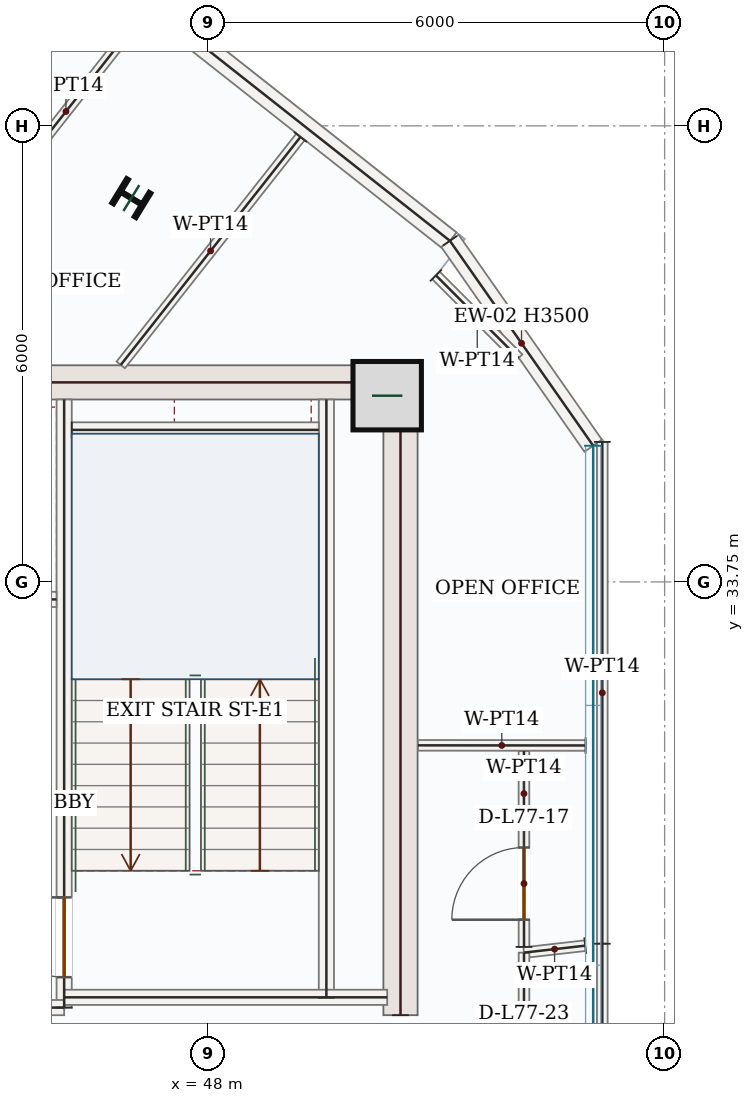
"""IFC4 building model, lengths in metres.
Left out: names, types, materials, properties, quantities, classifications, styles, units other than length and angle.
Written with IfcOpenShell. Run it as: python <this file> out.ifc"""

import sys

from ifc_helpers import new_model, si_unit, direction, frame, frame_2d, origin, origin_2d, place, context, subcontext, project, spatial, rectangle, i_section, extrude, source, transform, mapped, element, fill, save


model = new_model("IFC4")
c1 = context("Model", 3, precision=1e-05, world=origin(), true_north=direction((0.0, 1.0)))
c2 = subcontext(c1, "Body", "Model", "MODEL_VIEW")
j1 = project(units=[si_unit("LENGTHUNIT", "METRE"), si_unit("PLANEANGLEUNIT", "RADIAN")], contexts=[c1])
p1 = place(None, origin())
s1 = spatial("IfcSite", under=j1, at=p1, CompositionType="ELEMENT")
p2 = place(p1, origin())
s2 = spatial("IfcBuilding", under=s1, at=p2, CompositionType="ELEMENT")
p3 = place(p2, frame((0.0, 0.0, 319.8)))
s3 = spatial("IfcBuildingStorey", under=s2, at=p3, CompositionType="ELEMENT", Elevation=319.8)
m1 = source(origin(), c2, "Body", "SweptSolid", [
    extrude(rectangle(XDim=8.55, YDim=0.45, at=frame_2d((4.275, 0.0))), origin(), (0.0, 0.0, 1.0), 3.5),
])
p4 = place(p3, frame((50.525, 28.05, 0.0), z_axis=(0.0, 0.0, 1.0), x_axis=(0.0, 1.0, 0.0)))
e1 = element("IfcWall", 1, at=p4, inside=s3, PredefinedType="SHEAR", context=c2, shape_type="MappedRepresentation", body=[
    mapped(m1, transform((0.0, 0.0, 0.0), x_axis=(1.0, 0.0, 0.0), y_axis=(0.0, 1.0, 0.0), z_axis=(0.0, 0.0, 1.0), scale=1.0)),
])
m2 = source(origin(), c2, "Body", "SweptSolid", [
    extrude(rectangle(XDim=7.1, YDim=0.45, at=frame_2d((3.55, 0.0))), origin(), (0.0, 0.0, 1.0), 3.5),
])
p5 = place(p3, frame((43.2, 36.375, 0.0), z_axis=(0.0, 0.0, 1.0), x_axis=(1.0, 0.0, 0.0)))
e2 = element("IfcWall", 2, at=p5, inside=s3, PredefinedType="SHEAR", context=c2, shape_type="MappedRepresentation", body=[
    mapped(m2, transform((0.0, 0.0, 0.0), x_axis=(1.0, 0.0, 0.0), y_axis=(0.0, 1.0, 0.0), z_axis=(0.0, 0.0, 1.0), scale=1.0)),
])
m3 = source(origin(), c2, "Body", "SweptSolid", [
    extrude(rectangle(XDim=0.9, YDim=0.9, at=origin_2d()), origin(), (0.0, 0.0, 1.0), 3.75),
])
p6 = place(p3, frame((50.35, 36.2, 0.0), z_axis=(0.0, 0.0, 1.0), x_axis=(1.0, 0.0, 0.0)))
e3 = element("IfcColumn", 3, at=p6, inside=s3, PredefinedType="COLUMN", context=c2, shape_type="MappedRepresentation", body=[
    mapped(m3, transform((0.0, 0.0, 0.0), x_axis=(1.0, 0.0, 0.0), y_axis=(0.0, 1.0, 0.0), z_axis=(0.0, 0.0, 1.0), scale=1.0)),
])
m4 = source(origin(), c2, "Body", "SweptSolid", [
    extrude(i_section(OverallWidth=0.374, OverallDepth=0.372, WebThickness=0.016, FlangeThickness=0.026, FilletRadius=0.018, at=origin_2d()), origin(), (0.0, 0.0, 1.0), 3.75),
])
p7 = place(p3, frame((46.984, 38.8, 0.0), z_axis=(0.0, 0.0, 1.0), x_axis=(0.522498564716, 0.852640164354, 0.0)))
e4 = element("IfcColumn", 4, at=p7, inside=s3, PredefinedType="COLUMN", context=c2, shape_type="MappedRepresentation", body=[
    mapped(m4, transform((0.0, 0.0, 0.0), x_axis=(1.0, 0.0, 0.0), y_axis=(0.0, 1.0, 0.0), z_axis=(0.0, 0.0, 1.0), scale=1.0)),
])
m5 = source(origin(), c2, "Body", "SweptSolid", [
    extrude(rectangle(XDim=9.92, YDim=0.28, at=frame_2d((4.96, 0.0))), origin(), (0.0, 0.0, 1.0), 3.5),
])
p8 = place(p3, frame((43.385, 44.379, 0.0), z_axis=(0.0, 0.0, 1.0), x_axis=(0.785317257435, -0.619093535077, 0.0)))
e5 = element("IfcWall", 5, at=p8, inside=s3, PredefinedType="SOLIDWALL", context=c2, shape_type="MappedRepresentation", body=[
    mapped(m5, transform((0.0, 0.0, 0.0), x_axis=(1.0, 0.0, 0.0), y_axis=(0.0, 1.0, 0.0), z_axis=(0.0, 0.0, 1.0), scale=1.0)),
])
m6 = source(origin(), c2, "Body", "SweptSolid", [
    extrude(rectangle(XDim=3.29, YDim=0.28, at=frame_2d((1.645, 0.0))), origin(), (0.0, 0.0, 1.0), 3.5),
])
p9 = place(p3, frame((51.175, 38.238, 0.0), z_axis=(0.0, 0.0, 1.0), x_axis=(0.573043854491, -0.819524704222, 0.0)))
e6 = element("IfcWall", 6, at=p9, inside=s3, PredefinedType="SOLIDWALL", context=c2, shape_type="MappedRepresentation", body=[
    mapped(m6, transform((0.0, 0.0, 0.0), x_axis=(1.0, 0.0, 0.0), y_axis=(0.0, 1.0, 0.0), z_axis=(0.0, 0.0, 1.0), scale=1.0)),
])
m7 = source(origin(), c2, "Body", "SweptSolid", [
    extrude(rectangle(XDim=7.87, YDim=0.2, at=frame_2d((3.935, 0.0))), origin(), (0.0, 0.0, 1.0), 3.5),
])
p10 = place(p3, frame((49.55, 28.28, 0.0), z_axis=(0.0, 0.0, 1.0), x_axis=(0.0, 1.0, 0.0)))
e7 = element("IfcWall", 7, at=p10, inside=s3, PredefinedType="SOLIDWALL", context=c2, shape_type="MappedRepresentation", body=[
    mapped(m7, transform((0.0, 0.0, 0.0), x_axis=(1.0, 0.0, 0.0), y_axis=(0.0, 1.0, 0.0), z_axis=(0.0, 0.0, 1.0), scale=1.0)),
])
p11 = place(p3, frame((46.1, 28.15, 0.0), z_axis=(0.0, 0.0, 1.0), x_axis=(0.0, 1.0, 0.0)))
e8 = element("IfcWall", 8, at=p11, inside=s3, PredefinedType="SOLIDWALL", context=c2, shape_type="SweptSolid", body=[
    extrude(rectangle(XDim=8.0, YDim=0.2, at=frame_2d((4.0, 0.0))), origin(), (0.0, 0.0, 1.0), 3.5),
])
p12 = place(p11, frame((0.4, 0.0, 0.0)))
e9 = element("IfcOpeningElement", 9, at=p12, cuts=e8, PredefinedType="OPENING", context=c2, shape_type="SweptSolid", body=[
    extrude(rectangle(XDim=1.05, YDim=2.15, at=frame_2d((0.525, 1.075))), frame((0.0, 0.11, 0.0), z_axis=(0.0, -1.0, 0.0), x_axis=(1.0, 0.0, 0.0)), (0.0, 0.0, 1.0), 0.22),
])
m8 = source(origin(), c2, "Body", "SweptSolid", [
    extrude(rectangle(XDim=3.0, YDim=0.2, at=frame_2d((1.5, 0.0))), origin(), (0.0, 0.0, 1.0), 3.5),
])
p13 = place(p3, frame((43.1, 28.15, 0.0), z_axis=(0.0, 0.0, 1.0), x_axis=(1.0, 0.0, 0.0)))
e10 = element("IfcWall", 10, at=p13, inside=s3, PredefinedType="SOLIDWALL", context=c2, shape_type="MappedRepresentation", body=[
    mapped(m8, transform((0.0, 0.0, 0.0), x_axis=(1.0, 0.0, 0.0), y_axis=(0.0, 1.0, 0.0), z_axis=(0.0, 0.0, 1.0), scale=1.0)),
])
m9 = source(origin(), c2, "Body", "SweptSolid", [
    extrude(rectangle(XDim=4.25, YDim=0.2, at=frame_2d((2.125, 0.0))), origin(), (0.0, 0.0, 1.0), 3.5),
])
p14 = place(p3, frame((46.1, 28.285, 0.0), z_axis=(0.0, 0.0, 1.0), x_axis=(1.0, 0.0, 0.0)))
e11 = element("IfcWall", 11, at=p14, inside=s3, PredefinedType="SOLIDWALL", context=c2, shape_type="MappedRepresentation", body=[
    mapped(m9, transform((0.0, 0.0, 0.0), x_axis=(1.0, 0.0, 0.0), y_axis=(0.0, 1.0, 0.0), z_axis=(0.0, 0.0, 1.0), scale=1.0)),
])
m10 = source(origin(), c2, "Body", "SweptSolid", [
    extrude(rectangle(XDim=3.25, YDim=0.2, at=frame_2d((1.625, 0.0))), origin(), (0.0, 0.0, 1.0), 3.5),
])
p15 = place(p3, frame((46.2, 35.75, 0.0), z_axis=(0.0, 0.0, 1.0), x_axis=(1.0, 0.0, 0.0)))
e12 = element("IfcWall", 12, at=p15, inside=s3, PredefinedType="SOLIDWALL", context=c2, shape_type="MappedRepresentation", body=[
    mapped(m10, transform((0.0, 0.0, 0.0), x_axis=(1.0, 0.0, 0.0), y_axis=(0.0, 1.0, 0.0), z_axis=(0.0, 0.0, 1.0), scale=1.0)),
])
p16 = place(p3, frame((43.25, 33.52, 0.0), z_axis=(0.0, 0.0, 1.0), x_axis=(1.0, 0.0, 0.0)))
e13 = element("IfcWall", 13, at=p16, inside=s3, PredefinedType="SOLIDWALL", context=c2, shape_type="SweptSolid", body=[
    extrude(rectangle(XDim=2.75, YDim=0.2, at=frame_2d((1.375, 0.0))), origin(), (0.0, 0.0, 1.0), 3.5),
])
p17 = place(p16, frame((0.82, 0.0, 0.0)))
e14 = element("IfcOpeningElement", 14, at=p17, cuts=e13, PredefinedType="OPENING", context=c2, shape_type="SweptSolid", body=[
    extrude(rectangle(XDim=1.1, YDim=2.15, at=frame_2d((0.55, 1.075))), frame((0.0, 0.11, 0.0), z_axis=(0.0, -1.0, 0.0), x_axis=(1.0, 0.0, 0.0)), (0.0, 0.0, 1.0), 0.22),
])
m11 = source(origin(), c2, "Body", "SweptSolid", [
    extrude(rectangle(XDim=3.818, YDim=0.14, at=frame_2d((1.909, 0.0))), origin(), (0.0, 0.0, 1.0), 3.5),
])
p18 = place(p3, frame((49.208, 39.604, 0.0), z_axis=(0.0, 0.0, 1.0), x_axis=(-0.619119655452, -0.78529666511, 0.0)))
e15 = element("IfcWall", 15, at=p18, inside=s3, PredefinedType="PARTITIONING", context=c2, shape_type="MappedRepresentation", body=[
    mapped(m11, transform((0.0, 0.0, 0.0), x_axis=(1.0, 0.0, 0.0), y_axis=(0.0, 1.0, 0.0), z_axis=(0.0, 0.0, 1.0), scale=1.0)),
])
p19 = place(p3, frame((43.823, 37.02, 0.0), z_axis=(0.0, 0.0, 1.0), x_axis=(0.619105408422, 0.785307897109, 0.0)))
e16 = element("IfcWall", 16, at=p19, inside=s3, PredefinedType="PARTITIONING", context=c2, shape_type="SweptSolid", body=[
    extrude(rectangle(XDim=5.363, YDim=0.14, at=frame_2d((2.682, 0.0))), origin(), (0.0, 0.0, 1.0), 3.5),
])
p20 = place(p19, frame((0.971, 0.0, 0.0)))
e17 = element("IfcOpeningElement", 17, at=p20, cuts=e16, PredefinedType="OPENING", context=c2, shape_type="SweptSolid", body=[
    extrude(rectangle(XDim=0.95, YDim=2.15, at=frame_2d((0.475, 1.075))), frame((0.0, 0.08, 0.0), z_axis=(0.0, -1.0, 0.0), x_axis=(1.0, 0.0, 0.0)), (0.0, 0.0, 1.0), 0.16),
])
m12 = source(origin(), c2, "Body", "SweptSolid", [
    extrude(rectangle(XDim=2.205, YDim=0.14, at=frame_2d((1.103, 0.0))), origin(), (0.0, 0.0, 1.0), 3.5),
])
p21 = place(p3, frame((52.96, 31.598, 0.0), z_axis=(0.0, 0.0, 1.0), x_axis=(-0.99999969967, 0.000775021911, 0.0)))
e18 = element("IfcWall", 18, at=p21, inside=s3, PredefinedType="PARTITIONING", context=c2, shape_type="MappedRepresentation", body=[
    mapped(m12, transform((0.0, 0.0, 0.0), x_axis=(1.0, 0.0, 0.0), y_axis=(0.0, 1.0, 0.0), z_axis=(0.0, 0.0, 1.0), scale=1.0)),
])
m13 = source(origin(), c2, "Body", "SweptSolid", [
    extrude(rectangle(XDim=1.538, YDim=0.14, at=frame_2d((0.769, 0.0))), origin(), (0.0, 0.0, 1.0), 3.5),
])
p22 = place(p3, frame((50.991, 37.783, 0.0), z_axis=(0.0, 0.0, 1.0), x_axis=(0.706709909315, -0.707503430434, 0.0)))
e19 = element("IfcWall", 19, at=p22, inside=s3, PredefinedType="PARTITIONING", context=c2, shape_type="MappedRepresentation", body=[
    mapped(m13, transform((0.0, 0.0, 0.0), x_axis=(1.0, 0.0, 0.0), y_axis=(0.0, 1.0, 0.0), z_axis=(0.0, 0.0, 1.0), scale=1.0)),
])
m14 = source(origin(), c2, "Body", "SweptSolid", [
    extrude(rectangle(XDim=6.602, YDim=0.14, at=frame_2d((3.301, 0.0))), origin(), (0.0, 0.0, 1.0), 3.5),
])
p23 = place(p3, frame((53.18, 35.592, 0.0), z_axis=(0.0, 0.0, 1.0), x_axis=(0.0, -1.0, 0.0)))
e20 = element("IfcWall", 20, at=p23, inside=s3, PredefinedType="PARTITIONING", context=c2, shape_type="MappedRepresentation", body=[
    mapped(m14, transform((0.0, 0.0, 0.0), x_axis=(1.0, 0.0, 0.0), y_axis=(0.0, 1.0, 0.0), z_axis=(0.0, 0.0, 1.0), scale=1.0)),
])
m15 = source(origin(), c2, "Body", "SweptSolid", [
    extrude(rectangle(XDim=0.81, YDim=0.14, at=frame_2d((0.405, 0.0))), origin(), (0.0, 0.0, 1.0), 3.5),
])
p24 = place(p3, frame((52.955, 28.965, 0.0), z_axis=(0.0, 0.0, 1.0), x_axis=(-0.99359757088, -0.112977285955, 0.0)))
e21 = element("IfcWall", 21, at=p24, inside=s3, PredefinedType="PARTITIONING", context=c2, shape_type="MappedRepresentation", body=[
    mapped(m15, transform((0.0, 0.0, 0.0), x_axis=(1.0, 0.0, 0.0), y_axis=(0.0, 1.0, 0.0), z_axis=(0.0, 0.0, 1.0), scale=1.0)),
])
p25 = place(p3, frame((52.15, 28.948, 0.0), z_axis=(0.0, 0.0, 1.0), x_axis=(-0.000379182834, 0.99999992811, 0.0)))
e22 = element("IfcWall", 22, at=p25, inside=s3, PredefinedType="PARTITIONING", context=c2, shape_type="SweptSolid", body=[
    extrude(rectangle(XDim=2.575, YDim=0.14, at=frame_2d((1.288, 0.0))), origin(), (0.0, 0.0, 1.0), 3.5),
])
p26 = place(p25, frame((0.358, 0.0, 0.0)))
e23 = element("IfcOpeningElement", 23, at=p26, cuts=e22, PredefinedType="OPENING", context=c2, shape_type="SweptSolid", body=[
    extrude(rectangle(XDim=0.95, YDim=2.15, at=frame_2d((0.475, 1.075))), frame((0.0, 0.08, 0.0), z_axis=(0.0, -1.0, 0.0), x_axis=(1.0, 0.0, 0.0)), (0.0, 0.0, 1.0), 0.16),
])
p27 = place(p3, frame((52.147, 22.477, 0.0), z_axis=(0.0, 0.0, 1.0), x_axis=(0.0003817085, 0.999999927149, 0.0)))
e24 = element("IfcWall", 24, at=p27, inside=s3, PredefinedType="PARTITIONING", context=c2, shape_type="SweptSolid", body=[
    extrude(rectangle(XDim=6.396, YDim=0.14, at=frame_2d((3.198, 0.0))), origin(), (0.0, 0.0, 1.0), 3.5),
])
p28 = place(p27, frame((4.248, 0.0, 0.0)))
e25 = element("IfcOpeningElement", 25, at=p28, cuts=e24, PredefinedType="OPENING", context=c2, shape_type="SweptSolid", body=[
    extrude(rectangle(XDim=0.95, YDim=2.15, at=frame_2d((0.475, 1.075))), frame((0.0, 0.08, 0.0), z_axis=(0.0, -1.0, 0.0), x_axis=(1.0, 0.0, 0.0)), (0.0, 0.0, 1.0), 0.16),
])
m16 = source(origin(), c2, "Body", "SweptSolid", [
    extrude(rectangle(XDim=6.881, YDim=0.14, at=frame_2d((3.441, 0.0))), origin(), (0.0, 0.0, 1.0), 3.5),
])
p29 = place(p3, frame((53.18, 28.99, 0.0), z_axis=(0.0, 0.0, 1.0), x_axis=(0.0, -1.0, 0.0)))
e26 = element("IfcWall", 26, at=p29, inside=s3, PredefinedType="PARTITIONING", context=c2, shape_type="MappedRepresentation", body=[
    mapped(m16, transform((0.0, 0.0, 0.0), x_axis=(1.0, 0.0, 0.0), y_axis=(0.0, 1.0, 0.0), z_axis=(0.0, 0.0, 1.0), scale=1.0)),
])
m17 = source(origin(), c2, "Body", "SweptSolid", [
    extrude(rectangle(XDim=1.05, YDim=2.15, at=frame_2d((0.525, 1.075))), frame((0.0, 0.025, 0.0), z_axis=(0.0, -1.0, 0.0), x_axis=(1.0, 0.0, 0.0)), (0.0, 0.0, 1.0), 0.05),
])
p30 = place(p12, origin())
e27 = element("IfcDoor", 27, at=p30, inside=s3, OperationType="SINGLE_SWING_RIGHT", PredefinedType="DOOR", context=c2, shape_type="MappedRepresentation", body=[
    mapped(m17, transform((0.0, 0.0, 0.0), x_axis=(1.0, 0.0, 0.0), y_axis=(0.0, 1.0, 0.0), z_axis=(0.0, 0.0, 1.0), scale=1.0)),
])
fill(e9, e27)
m18 = source(origin(), c2, "Body", "SweptSolid", [
    extrude(rectangle(XDim=0.95, YDim=2.15, at=frame_2d((0.475, 1.075))), frame((0.0, 0.025, 0.0), z_axis=(0.0, -1.0, 0.0), x_axis=(1.0, 0.0, 0.0)), (0.0, 0.0, 1.0), 0.05),
])
p31 = place(p26, origin())
e28 = element("IfcDoor", 28, at=p31, inside=s3, OperationType="SINGLE_SWING_LEFT", PredefinedType="DOOR", context=c2, shape_type="MappedRepresentation", body=[
    mapped(m18, transform((0.0, 0.0, 0.0), x_axis=(1.0, 0.0, 0.0), y_axis=(0.0, 1.0, 0.0), z_axis=(0.0, 0.0, 1.0), scale=1.0)),
])
fill(e23, e28)
save(model, sys.argv[1])
